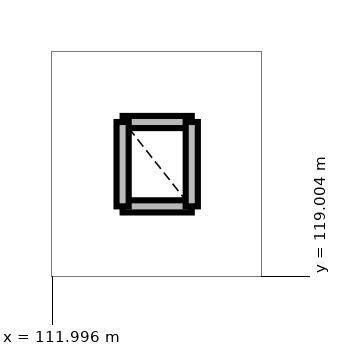
"""IFC4 building model, lengths in metres.
Left out: names, types, materials, properties, quantities, classifications, styles, units other than length and angle.
Written with IfcOpenShell. Run it as: python <this file> out.ifc"""

import sys

from ifc_helpers import new_model, si_unit, direction, frame, frame_2d, origin, place, context, subcontext, project, spatial, rectangle, extrude, element, save


model = new_model("IFC4")
c1 = context("Model", 3, precision=1e-05, world=origin(), true_north=direction((0.0, 1.0)))
c2 = subcontext(c1, "Body", "Model", "MODEL_VIEW")
j1 = project(units=[si_unit("LENGTHUNIT", "METRE"), si_unit("PLANEANGLEUNIT", "RADIAN")], contexts=[c1])
p1 = place(None, origin())
s1 = spatial("IfcSite", under=j1, at=p1, CompositionType="ELEMENT")
p2 = place(p1, origin())
s2 = spatial("IfcBuilding", under=s1, at=p2, CompositionType="ELEMENT")
p3 = place(p2, frame((0.0, 0.0, 13.5)))
s3 = spatial("IfcBuildingStorey", under=s2, at=p3, CompositionType="ELEMENT", Elevation=13.5)
for number, where, z_axis, x_axis in (
    (1, (112.92, 119.92, 0.0), (0.0, 0.0, 1.0), (1.0, 0.0, 0.0)),
    (2, (113.83, 121.03, 0.0), (0.0, 0.0, 1.0), (-1.0, 0.0, 0.0)),
):
    element("IfcWall", number, at=place(p3, frame(where, z_axis=z_axis, x_axis=x_axis)), inside=s3, PredefinedType="PARTITIONING", context=c2, shape_type="SweptSolid", body=[
        extrude(rectangle(XDim=0.91, YDim=0.16, at=frame_2d((0.455, 0.0))), origin(), (0.0, 0.0, 1.0), 3.65),
    ])
for number, where, z_axis, x_axis in (
    (3, (112.92, 121.03, 0.0), (0.0, 0.0, 1.0), (0.0, -1.0, 0.0)),
    (4, (113.83, 119.92, 0.0), (0.0, 0.0, 1.0), (0.0, 1.0, 0.0)),
):
    element("IfcWall", number, at=place(p3, frame(where, z_axis=z_axis, x_axis=x_axis)), inside=s3, PredefinedType="PARTITIONING", context=c2, shape_type="SweptSolid", body=[
        extrude(rectangle(XDim=1.11, YDim=0.16, at=frame_2d((0.555, 0.0))), origin(), (0.0, 0.0, 1.0), 3.65),
    ])
save(model, sys.argv[1])
